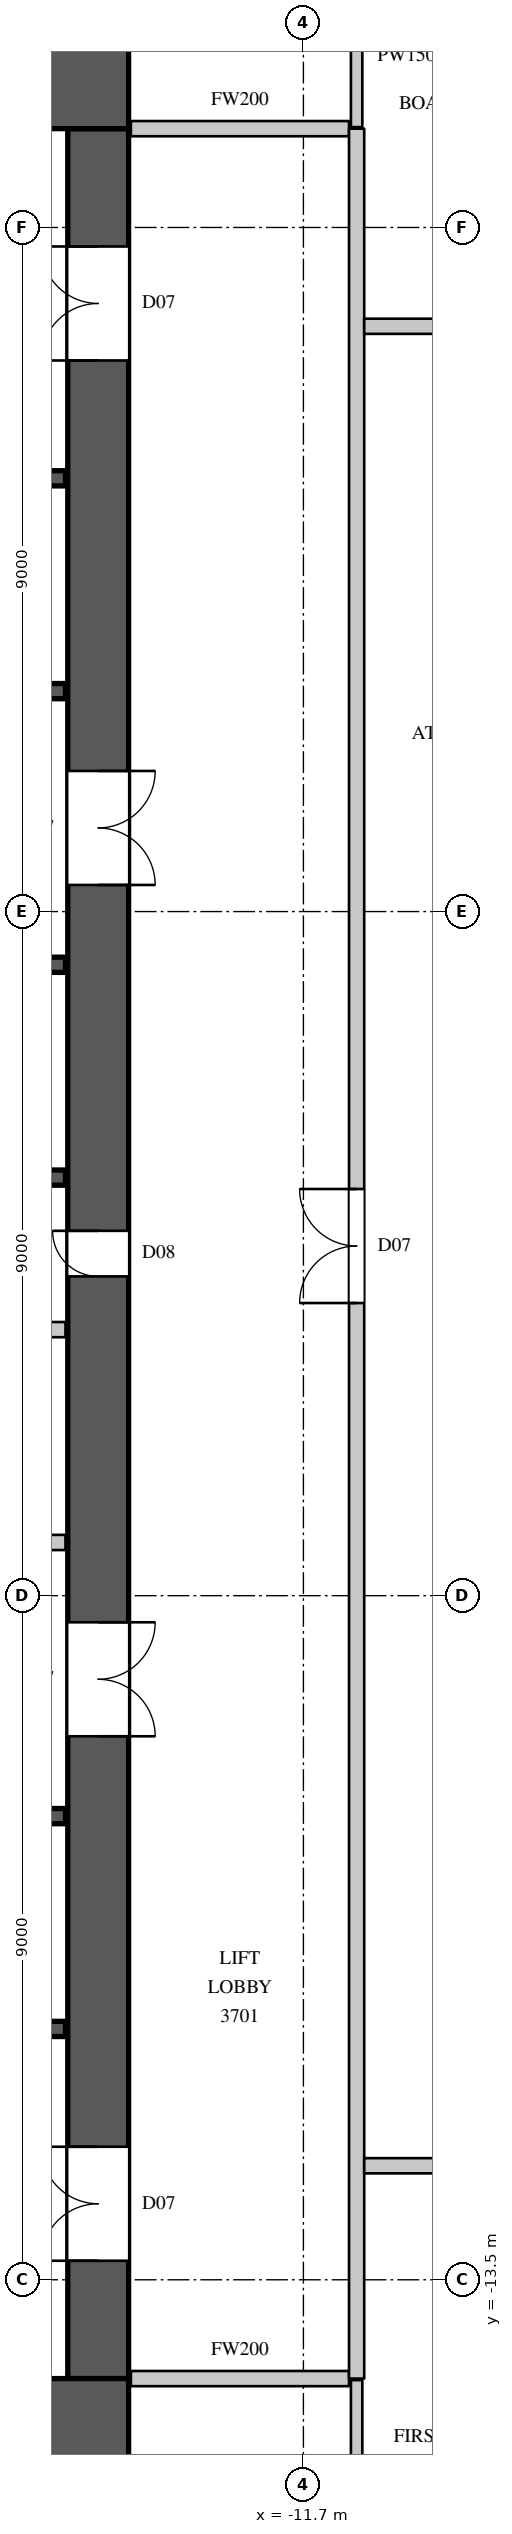
"""IFC4 building model, lengths in metres.
Left out: names, types, materials, properties, quantities, classifications, styles, units other than length and angle.
Written with IfcOpenShell. Run it as: python <this file> out.ifc"""

import sys

from ifc_helpers import new_model, si_unit, direction, frame, frame_2d, origin, place, context, subcontext, project, spatial, rectangle, extrude, element, fill, save


model = new_model("IFC4")
c1 = context("Model", 3, precision=1e-05, world=origin(), true_north=direction((0.0, 1.0)))
c2 = subcontext(c1, "Body", "Model", "MODEL_VIEW")
j1 = project(units=[si_unit("LENGTHUNIT", "METRE"), si_unit("PLANEANGLEUNIT", "RADIAN")], contexts=[c1])
p1 = place(None, origin())
s1 = spatial("IfcSite", under=j1, at=p1, CompositionType="ELEMENT")
p2 = place(p1, origin())
s2 = spatial("IfcBuilding", under=s1, at=p2, CompositionType="ELEMENT")
p3 = place(p2, frame((0.0, 0.0, 172.8)))
s3 = spatial("IfcBuildingStorey", under=s2, at=p3, CompositionType="ELEMENT", Elevation=172.8)
for number, where, z_axis, x_axis in (
    (1, (-30.0, 15.4, 0.0), (0.0, 0.0, 1.0), (1.0, 0.0, 0.0)),
    (2, (-30.0, -15.4, 0.0), (0.0, 0.0, 1.0), (1.0, 0.0, 0.0)),
):
    element("IfcWall", number, at=place(p3, frame(where, z_axis=z_axis, x_axis=x_axis)), inside=s3, PredefinedType="SHEAR", context=c2, shape_type="SweptSolid", body=[
        extrude(rectangle(XDim=16.0, YDim=1.2, at=frame_2d((8.0, 0.0))), origin(), (0.0, 0.0, 1.0), 4.1),
    ])
p4 = place(p3, frame((-14.4, -14.8, 0.0), z_axis=(0.0, 0.0, 1.0), x_axis=(0.0, 1.0, 0.0)))
e3 = element("IfcWall", 3, at=p4, inside=s3, PredefinedType="SHEAR", context=c2, shape_type="SweptSolid", body=[
    extrude(rectangle(XDim=29.6, YDim=0.8, at=frame_2d((14.8, 0.0))), origin(), (0.0, 0.0, 1.0), 4.1),
])
p5 = place(p4, frame((1.55, 0.0, 0.0)))
e4 = element("IfcOpeningElement", 4, at=p5, cuts=e3, PredefinedType="OPENING", context=c2, shape_type="SweptSolid", body=[
    extrude(rectangle(XDim=1.5, YDim=2.4, at=frame_2d((0.75, 1.2))), frame((0.0, 0.41, 0.0), z_axis=(0.0, -1.0, 0.0), x_axis=(1.0, 0.0, 0.0)), (0.0, 0.0, 1.0), 0.82),
])
p6 = place(p4, frame((26.55, 0.0, 0.0)))
e5 = element("IfcOpeningElement", 5, at=p6, cuts=e3, PredefinedType="OPENING", context=c2, shape_type="SweptSolid", body=[
    extrude(rectangle(XDim=1.5, YDim=2.4, at=frame_2d((0.75, 1.2))), frame((0.0, 0.41, 0.0), z_axis=(0.0, -1.0, 0.0), x_axis=(1.0, 0.0, 0.0)), (0.0, 0.0, 1.0), 0.82),
])
p7 = place(p4, frame((8.45, 0.0, 0.0)))
e6 = element("IfcOpeningElement", 6, at=p7, cuts=e3, PredefinedType="OPENING", context=c2, shape_type="SweptSolid", body=[
    extrude(rectangle(XDim=1.5, YDim=2.4, at=frame_2d((0.75, 1.2))), frame((0.0, 0.41, 0.0), z_axis=(0.0, -1.0, 0.0), x_axis=(1.0, 0.0, 0.0)), (0.0, 0.0, 1.0), 0.82),
])
p8 = place(p4, frame((19.65, 0.0, 0.0)))
e7 = element("IfcOpeningElement", 7, at=p8, cuts=e3, PredefinedType="OPENING", context=c2, shape_type="SweptSolid", body=[
    extrude(rectangle(XDim=1.5, YDim=2.4, at=frame_2d((0.75, 1.2))), frame((0.0, 0.41, 0.0), z_axis=(0.0, -1.0, 0.0), x_axis=(1.0, 0.0, 0.0)), (0.0, 0.0, 1.0), 0.82),
])
p9 = place(p4, frame((14.5, 0.0, 0.0)))
e8 = element("IfcOpeningElement", 8, at=p9, cuts=e3, PredefinedType="OPENING", context=c2, shape_type="SweptSolid", body=[
    extrude(rectangle(XDim=0.6, YDim=2.0, at=frame_2d((0.3, 1.0))), frame((0.0, 0.41, 0.0), z_axis=(0.0, -1.0, 0.0), x_axis=(1.0, 0.0, 0.0)), (0.0, 0.0, 1.0), 0.82),
])
p10 = place(p3, frame((-29.17, -3.8, 0.0), z_axis=(0.0, 0.0, 1.0), x_axis=(1.0, 0.0, 0.0)))
e9 = element("IfcWall", 9, at=p10, inside=s3, PredefinedType="PARTITIONING", context=c2, shape_type="SweptSolid", body=[
    extrude(rectangle(XDim=14.34, YDim=0.2, at=frame_2d((7.17, 0.0))), origin(), (0.0, 0.0, 1.0), 3.8),
])
p11 = place(p10, frame((6.7, 0.0, 0.0)))
e10 = element("IfcOpeningElement", 10, at=p11, cuts=e9, PredefinedType="OPENING", context=c2, shape_type="SweptSolid", body=[
    extrude(rectangle(XDim=0.9, YDim=2.2, at=frame_2d((0.45, 1.1))), frame((0.0, 0.11, 0.0), z_axis=(0.0, -1.0, 0.0), x_axis=(1.0, 0.0, 0.0)), (0.0, 0.0, 1.0), 0.22),
])
for number, where, z_axis, x_axis in (
    (11, (-13.97, -14.8, 0.0), (0.0, 0.0, 1.0), (1.0, 0.0, 0.0)),
    (12, (-13.97, 14.8, 0.0), (0.0, 0.0, 1.0), (1.0, 0.0, 0.0)),
):
    element("IfcWall", number, at=place(p3, frame(where, z_axis=z_axis, x_axis=x_axis)), inside=s3, PredefinedType="PARTITIONING", context=c2, shape_type="SweptSolid", body=[
        extrude(rectangle(XDim=2.87, YDim=0.2, at=frame_2d((1.435, 0.0))), origin(), (0.0, 0.0, 1.0), 3.8),
    ])
p12 = place(p3, frame((-11.0, -14.8, 0.0), z_axis=(0.0, 0.0, 1.0), x_axis=(0.0, 1.0, 0.0)))
e13 = element("IfcWall", 13, at=p12, inside=s3, PredefinedType="PARTITIONING", context=c2, shape_type="SweptSolid", body=[
    extrude(rectangle(XDim=29.6, YDim=0.2, at=frame_2d((14.8, 0.0))), origin(), (0.0, 0.0, 1.0), 3.8),
])
p13 = place(p12, frame((14.15, 0.0, 0.0)))
e14 = element("IfcOpeningElement", 14, at=p13, cuts=e13, PredefinedType="OPENING", context=c2, shape_type="SweptSolid", body=[
    extrude(rectangle(XDim=1.5, YDim=2.4, at=frame_2d((0.75, 1.2))), frame((0.0, 0.11, 0.0), z_axis=(0.0, -1.0, 0.0), x_axis=(1.0, 0.0, 0.0)), (0.0, 0.0, 1.0), 0.22),
])
p14 = place(p3, frame((-10.9, -12.0, 0.0), z_axis=(0.0, 0.0, 1.0), x_axis=(1.0, 0.0, 0.0)))
e15 = element("IfcWall", 15, at=p14, inside=s3, PredefinedType="PARTITIONING", context=c2, shape_type="SweptSolid", body=[
    extrude(rectangle(XDim=21.8, YDim=0.2, at=frame_2d((10.9, 0.0))), origin(), (0.0, 0.0, 1.0), 3.8),
])
p15 = place(p14, frame((0.95, 0.0, 0.0)))
e16 = element("IfcOpeningElement", 16, at=p15, cuts=e15, PredefinedType="OPENING", context=c2, shape_type="SweptSolid", body=[
    extrude(rectangle(XDim=0.9, YDim=2.2, at=frame_2d((0.45, 1.1))), frame((0.0, 0.11, 0.0), z_axis=(0.0, -1.0, 0.0), x_axis=(1.0, 0.0, 0.0)), (0.0, 0.0, 1.0), 0.22),
])
p16 = place(p14, frame((3.95, 0.0, 0.0)))
e17 = element("IfcOpeningElement", 17, at=p16, cuts=e15, PredefinedType="OPENING", context=c2, shape_type="SweptSolid", body=[
    extrude(rectangle(XDim=0.9, YDim=2.2, at=frame_2d((0.45, 1.1))), frame((0.0, 0.11, 0.0), z_axis=(0.0, -1.0, 0.0), x_axis=(1.0, 0.0, 0.0)), (0.0, 0.0, 1.0), 0.22),
])
p17 = place(p14, frame((6.7, 0.0, 0.0)))
e18 = element("IfcOpeningElement", 18, at=p17, cuts=e15, PredefinedType="OPENING", context=c2, shape_type="SweptSolid", body=[
    extrude(rectangle(XDim=0.9, YDim=2.2, at=frame_2d((0.45, 1.1))), frame((0.0, 0.11, 0.0), z_axis=(0.0, -1.0, 0.0), x_axis=(1.0, 0.0, 0.0)), (0.0, 0.0, 1.0), 0.22),
])
p18 = place(p14, frame((10.0, 0.0, 0.0)))
e19 = element("IfcOpeningElement", 19, at=p18, cuts=e15, PredefinedType="OPENING", context=c2, shape_type="SweptSolid", body=[
    extrude(rectangle(XDim=0.9, YDim=2.2, at=frame_2d((0.45, 1.1))), frame((0.0, 0.11, 0.0), z_axis=(0.0, -1.0, 0.0), x_axis=(1.0, 0.0, 0.0)), (0.0, 0.0, 1.0), 0.22),
])
p19 = place(p14, frame((13.55, 0.0, 0.0)))
e20 = element("IfcOpeningElement", 20, at=p19, cuts=e15, PredefinedType="OPENING", context=c2, shape_type="SweptSolid", body=[
    extrude(rectangle(XDim=0.9, YDim=2.2, at=frame_2d((0.45, 1.1))), frame((0.0, 0.11, 0.0), z_axis=(0.0, -1.0, 0.0), x_axis=(1.0, 0.0, 0.0)), (0.0, 0.0, 1.0), 0.22),
])
p20 = place(p14, frame((15.8, 0.0, 0.0)))
e21 = element("IfcOpeningElement", 21, at=p20, cuts=e15, PredefinedType="OPENING", context=c2, shape_type="SweptSolid", body=[
    extrude(rectangle(XDim=1.1, YDim=2.4, at=frame_2d((0.55, 1.2))), frame((0.0, 0.11, 0.0), z_axis=(0.0, -1.0, 0.0), x_axis=(1.0, 0.0, 0.0)), (0.0, 0.0, 1.0), 0.22),
])
p21 = place(p14, frame((18.0, 0.0, 0.0)))
e22 = element("IfcOpeningElement", 22, at=p21, cuts=e15, PredefinedType="OPENING", context=c2, shape_type="SweptSolid", body=[
    extrude(rectangle(XDim=1.1, YDim=2.4, at=frame_2d((0.55, 1.2))), frame((0.0, 0.11, 0.0), z_axis=(0.0, -1.0, 0.0), x_axis=(1.0, 0.0, 0.0)), (0.0, 0.0, 1.0), 0.22),
])
p22 = place(p3, frame((-10.9, 12.2, 0.0), z_axis=(0.0, 0.0, 1.0), x_axis=(1.0, 0.0, 0.0)))
e23 = element("IfcWall", 23, at=p22, inside=s3, PredefinedType="PARTITIONING", context=c2, shape_type="SweptSolid", body=[
    extrude(rectangle(XDim=3.704, YDim=0.2, at=frame_2d((1.852, 0.0))), origin(), (0.0, 0.0, 1.0), 3.8),
])
p23 = place(p22, frame((1.7, 0.0, 0.0)))
e24 = element("IfcOpeningElement", 24, at=p23, cuts=e23, PredefinedType="OPENING", context=c2, shape_type="SweptSolid", body=[
    extrude(rectangle(XDim=1.1, YDim=2.4, at=frame_2d((0.55, 1.2))), frame((0.0, 0.11, 0.0), z_axis=(0.0, -1.0, 0.0), x_axis=(1.0, 0.0, 0.0)), (0.0, 0.0, 1.0), 0.22),
])
for number, where, z_axis, x_axis in (
    (25, (-11.0, -16.7, 0.0), (0.0, 0.0, 1.0), (0.0, 1.0, 0.0)),
    (26, (-11.0, 14.82, 0.0), (0.0, 0.0, 1.0), (0.0, 1.0, 0.0)),
):
    element("IfcWall", number, at=place(p3, frame(where, z_axis=z_axis, x_axis=x_axis)), inside=s3, PredefinedType="PARTITIONING", context=c2, shape_type="SweptSolid", body=[
        extrude(rectangle(XDim=1.88, YDim=0.15, at=frame_2d((0.94, 0.0))), origin(), (0.0, 0.0, 1.0), 3.8),
    ])
p24 = place(p3, frame((-29.17, -1.0, 0.0), z_axis=(0.0, 0.0, 1.0), x_axis=(1.0, 0.0, 0.0)))
e27 = element("IfcWall", 27, at=p24, inside=s3, PredefinedType="PARTITIONING", context=c2, shape_type="SweptSolid", body=[
    extrude(rectangle(XDim=14.34, YDim=0.2, at=frame_2d((7.17, 0.0))), origin(), (0.0, 0.0, 1.0), 3.8),
])
p25 = place(p3, frame((-26.08, 1.0, 0.0), z_axis=(0.0, 0.0, 1.0), x_axis=(1.0, 0.0, 0.0)))
e28 = element("IfcWall", 28, at=p25, inside=s3, PredefinedType="SHEAR", context=c2, shape_type="SweptSolid", body=[
    extrude(rectangle(XDim=11.25, YDim=0.2, at=frame_2d((5.625, 0.0))), origin(), (0.0, 0.0, 1.0), 3.8),
])
p26 = place(p3, frame((-26.08, 3.8, 0.0), z_axis=(0.0, 0.0, 1.0), x_axis=(1.0, 0.0, 0.0)))
e29 = element("IfcWall", 29, at=p26, inside=s3, PredefinedType="SHEAR", context=c2, shape_type="SweptSolid", body=[
    extrude(rectangle(XDim=11.25, YDim=0.2, at=frame_2d((5.625, 0.0))), origin(), (0.0, 0.0, 1.0), 3.8),
])
p27 = place(p26, frame((0.8, 0.0, 0.0)))
e30 = element("IfcOpeningElement", 30, at=p27, cuts=e29, PredefinedType="OPENING", context=c2, shape_type="SweptSolid", body=[
    extrude(rectangle(XDim=1.1, YDim=2.2, at=frame_2d((0.55, 1.1))), frame((0.0, 0.11, 0.0), z_axis=(0.0, -1.0, 0.0), x_axis=(1.0, 0.0, 0.0)), (0.0, 0.0, 1.0), 0.22),
])
p28 = place(p26, frame((3.55, 0.0, 0.0)))
e31 = element("IfcOpeningElement", 31, at=p28, cuts=e29, PredefinedType="OPENING", context=c2, shape_type="SweptSolid", body=[
    extrude(rectangle(XDim=1.1, YDim=2.2, at=frame_2d((0.55, 1.1))), frame((0.0, 0.11, 0.0), z_axis=(0.0, -1.0, 0.0), x_axis=(1.0, 0.0, 0.0)), (0.0, 0.0, 1.0), 0.22),
])
p29 = place(p26, frame((6.25, 0.0, 0.0)))
e32 = element("IfcOpeningElement", 32, at=p29, cuts=e29, PredefinedType="OPENING", context=c2, shape_type="SweptSolid", body=[
    extrude(rectangle(XDim=1.1, YDim=2.2, at=frame_2d((0.55, 1.1))), frame((0.0, 0.11, 0.0), z_axis=(0.0, -1.0, 0.0), x_axis=(1.0, 0.0, 0.0)), (0.0, 0.0, 1.0), 0.22),
])
p30 = place(p26, frame((9.15, 0.0, 0.0)))
e33 = element("IfcOpeningElement", 33, at=p30, cuts=e29, PredefinedType="OPENING", context=c2, shape_type="SweptSolid", body=[
    extrude(rectangle(XDim=1.1, YDim=2.2, at=frame_2d((0.55, 1.1))), frame((0.0, 0.11, 0.0), z_axis=(0.0, -1.0, 0.0), x_axis=(1.0, 0.0, 0.0)), (0.0, 0.0, 1.0), 0.22),
])
p31 = place(p3, frame((-17.92, -10.2, 0.0), z_axis=(0.0, 0.0, 1.0), x_axis=(1.0, 0.0, 0.0)))
e34 = element("IfcWall", 34, at=p31, inside=s3, PredefinedType="SHEAR", context=c2, shape_type="SweptSolid", body=[
    extrude(rectangle(XDim=3.09, YDim=0.2, at=frame_2d((1.545, 0.0))), origin(), (0.0, 0.0, 1.0), 3.8),
])
p32 = place(p31, frame((1.0, 0.0, 0.0)))
e35 = element("IfcOpeningElement", 35, at=p32, cuts=e34, PredefinedType="OPENING", context=c2, shape_type="SweptSolid", body=[
    extrude(rectangle(XDim=1.1, YDim=2.2, at=frame_2d((0.55, 1.1))), frame((0.0, 0.11, 0.0), z_axis=(0.0, -1.0, 0.0), x_axis=(1.0, 0.0, 0.0)), (0.0, 0.0, 1.0), 0.22),
])
p33 = place(p3, frame((-17.9, -7.4, 0.0), z_axis=(0.0, 0.0, 1.0), x_axis=(1.0, 0.0, 0.0)))
e36 = element("IfcWall", 36, at=p33, inside=s3, PredefinedType="SHEAR", context=c2, shape_type="SweptSolid", body=[
    extrude(rectangle(XDim=3.07, YDim=0.2, at=frame_2d((1.535, 0.0))), origin(), (0.0, 0.0, 1.0), 3.8),
])
p34 = place(p3, frame((-17.92, 7.4, 0.0), z_axis=(0.0, 0.0, 1.0), x_axis=(1.0, 0.0, 0.0)))
e37 = element("IfcWall", 37, at=p34, inside=s3, PredefinedType="SHEAR", context=c2, shape_type="SweptSolid", body=[
    extrude(rectangle(XDim=3.09, YDim=0.2, at=frame_2d((1.545, 0.0))), origin(), (0.0, 0.0, 1.0), 3.8),
])
p35 = place(p3, frame((-17.92, 10.2, 0.0), z_axis=(0.0, 0.0, 1.0), x_axis=(1.0, 0.0, 0.0)))
e38 = element("IfcWall", 38, at=p35, inside=s3, PredefinedType="SHEAR", context=c2, shape_type="SweptSolid", body=[
    extrude(rectangle(XDim=3.09, YDim=0.2, at=frame_2d((1.545, 0.0))), origin(), (0.0, 0.0, 1.0), 3.8),
])
p36 = place(p35, frame((1.0, 0.0, 0.0)))
e39 = element("IfcOpeningElement", 39, at=p36, cuts=e38, PredefinedType="OPENING", context=c2, shape_type="SweptSolid", body=[
    extrude(rectangle(XDim=1.1, YDim=2.2, at=frame_2d((0.55, 1.1))), frame((0.0, 0.11, 0.0), z_axis=(0.0, -1.0, 0.0), x_axis=(1.0, 0.0, 0.0)), (0.0, 0.0, 1.0), 0.22),
])
p37 = place(p13, origin())
e40 = element("IfcDoor", 40, at=p37, inside=s3, OperationType="DOUBLE_DOOR_SINGLE_SWING", PredefinedType="DOOR", context=c2, shape_type="SweptSolid", body=[
    extrude(rectangle(XDim=1.5, YDim=2.4, at=frame_2d((0.75, 1.2))), frame((0.0, 0.025, 0.0), z_axis=(0.0, -1.0, 0.0), x_axis=(1.0, 0.0, 0.0)), (0.0, 0.0, 1.0), 0.05),
])
fill(e14, e40)
p38 = place(p5, origin())
e41 = element("IfcDoor", 41, at=p38, inside=s3, OperationType="DOUBLE_DOOR_SINGLE_SWING", PredefinedType="DOOR", context=c2, shape_type="SweptSolid", body=[
    extrude(rectangle(XDim=1.5, YDim=2.4, at=frame_2d((0.75, 1.2))), frame((0.0, 0.395, 0.0), z_axis=(0.0, -1.0, 0.0), x_axis=(1.0, 0.0, 0.0)), (0.0, 0.0, 1.0), 0.05),
])
fill(e4, e41)
p39 = place(p6, origin())
e42 = element("IfcDoor", 42, at=p39, inside=s3, OperationType="DOUBLE_DOOR_SINGLE_SWING", PredefinedType="DOOR", context=c2, shape_type="SweptSolid", body=[
    extrude(rectangle(XDim=1.5, YDim=2.4, at=frame_2d((0.75, 1.2))), frame((0.0, 0.395, 0.0), z_axis=(0.0, -1.0, 0.0), x_axis=(1.0, 0.0, 0.0)), (0.0, 0.0, 1.0), 0.05),
])
fill(e5, e42)
p40 = place(p7, origin())
e43 = element("IfcDoor", 43, at=p40, inside=s3, OperationType="DOUBLE_DOOR_SINGLE_SWING", PredefinedType="DOOR", context=c2, shape_type="SweptSolid", body=[
    extrude(rectangle(XDim=1.5, YDim=2.4, at=frame_2d((0.75, 1.2))), frame((0.0, -0.345, 0.0), z_axis=(0.0, -1.0, 0.0), x_axis=(1.0, 0.0, 0.0)), (0.0, 0.0, 1.0), 0.05),
])
fill(e6, e43)
p41 = place(p8, origin())
e44 = element("IfcDoor", 44, at=p41, inside=s3, OperationType="DOUBLE_DOOR_SINGLE_SWING", PredefinedType="DOOR", context=c2, shape_type="SweptSolid", body=[
    extrude(rectangle(XDim=1.5, YDim=2.4, at=frame_2d((0.75, 1.2))), frame((0.0, -0.345, 0.0), z_axis=(0.0, -1.0, 0.0), x_axis=(1.0, 0.0, 0.0)), (0.0, 0.0, 1.0), 0.05),
])
fill(e7, e44)
p42 = place(p9, origin())
e45 = element("IfcDoor", 45, at=p42, inside=s3, OperationType="SINGLE_SWING_RIGHT", PredefinedType="DOOR", context=c2, shape_type="SweptSolid", body=[
    extrude(rectangle(XDim=0.6, YDim=2.0, at=frame_2d((0.3, 1.0))), frame((0.0, 0.395, 0.0), z_axis=(0.0, -1.0, 0.0), x_axis=(1.0, 0.0, 0.0)), (0.0, 0.0, 1.0), 0.05),
])
fill(e8, e45)
save(model, sys.argv[1])
